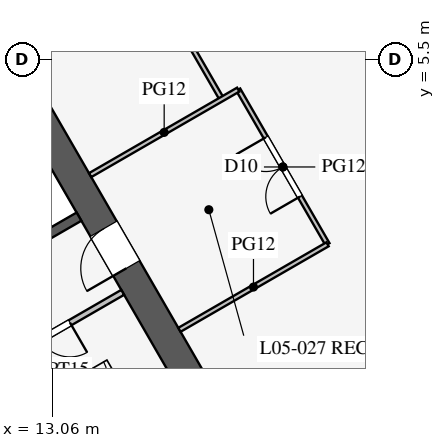
"""IFC4 building model, lengths in metres.
Left out: names, types, materials, properties, quantities, classifications, styles, units other than length and angle.
Written with IfcOpenShell. Run it as: python <this file> out.ifc"""

import sys

from ifc_helpers import new_model, si_unit, direction, frame, frame_2d, origin, place, context, subcontext, project, spatial, rectangle, extrude, element, fill, save


model = new_model("IFC4")
c1 = context("Model", 3, precision=1e-05, world=origin(), true_north=direction((0.0, 1.0)))
c2 = subcontext(c1, "Body", "Model", "MODEL_VIEW")
j1 = project(units=[si_unit("LENGTHUNIT", "METRE"), si_unit("PLANEANGLEUNIT", "RADIAN")], contexts=[c1])
p1 = place(None, origin())
s1 = spatial("IfcSite", under=j1, at=p1, CompositionType="ELEMENT")
p2 = place(p1, origin())
s2 = spatial("IfcBuilding", under=s1, at=p2, CompositionType="ELEMENT")
p3 = place(p2, frame((0.0, 0.0, 24.9)))
s3 = spatial("IfcBuildingStorey", under=s2, at=p3, CompositionType="ELEMENT", Elevation=24.9)
p4 = place(p3, frame((16.743, -3.0, 0.0), z_axis=(0.0, 0.0, 1.0), x_axis=(-0.500002442456, 0.866023993627, 0.0)))
e1 = element("IfcWall", 1, at=p4, inside=s3, PredefinedType="SHEAR", context=c2, shape_type="SweptSolid", body=[
    extrude(rectangle(XDim=21.939, YDim=0.8, at=frame_2d((10.97, 0.0))), origin(), (0.0, 0.0, 1.0), 4.2),
])
p5 = place(p4, frame((17.27, 0.0, 0.0)))
e2 = element("IfcOpeningElement", 2, at=p5, cuts=e1, PredefinedType="OPENING", context=c2, shape_type="SweptSolid", body=[
    extrude(rectangle(XDim=1.2, YDim=2.1, at=frame_2d((0.6, 1.05))), frame((0.0, 0.41, 0.0), z_axis=(0.0, -1.0, 0.0), x_axis=(1.0, 0.0, 0.0)), (0.0, 0.0, 1.0), 0.82),
])
p6 = place(p4, frame((3.47, 0.0, 0.0)))
e3 = element("IfcOpeningElement", 3, at=p6, cuts=e1, PredefinedType="OPENING", context=c2, shape_type="SweptSolid", body=[
    extrude(rectangle(XDim=1.2, YDim=2.1, at=frame_2d((0.6, 1.05))), frame((0.0, 0.41, 0.0), z_axis=(0.0, -1.0, 0.0), x_axis=(1.0, 0.0, 0.0)), (0.0, 0.0, 1.0), 0.82),
])
p7 = place(p3, frame((11.532, 0.076, 0.0), z_axis=(0.0, 0.0, 1.0), x_axis=(0.866005588531, 0.500034319456, 0.0)))
e4 = element("IfcWall", 4, at=p7, inside=s3, PredefinedType="SHEAR", context=c2, shape_type="SweptSolid", body=[
    extrude(rectangle(XDim=2.575, YDim=0.25, at=frame_2d((1.288, 0.0))), origin(), (0.0, 0.0, 1.0), 4.2),
])
p8 = place(p3, frame((6.663, -1.509, 0.0), z_axis=(0.0, 0.0, 1.0), x_axis=(0.866019375473, -0.500010441196, 0.0)))
e5 = element("IfcWall", 5, at=p8, inside=s3, PredefinedType="SHEAR", context=c2, shape_type="SweptSolid", body=[
    extrude(rectangle(XDim=9.075, YDim=0.6, at=frame_2d((4.538, 0.0))), origin(), (0.0, 0.0, 1.0), 4.2),
])
p9 = place(p3, frame((10.495, -3.178, 0.0), z_axis=(0.0, 0.0, 1.0), x_axis=(0.86602216432, 0.500005610874, 0.0)))
e6 = element("IfcWall", 6, at=p9, inside=s3, PredefinedType="PARTITIONING", context=c2, shape_type="SweptSolid", body=[
    extrude(rectangle(XDim=5.1, YDim=0.15, at=frame_2d((2.55, 0.0))), origin(), (0.0, 0.0, 1.0), 4.0),
])
p10 = place(p9, frame((2.6, 0.0, 0.0)))
e7 = element("IfcOpeningElement", 7, at=p10, cuts=e6, PredefinedType="OPENING", context=c2, shape_type="SweptSolid", body=[
    extrude(rectangle(XDim=0.9, YDim=2.1, at=frame_2d((0.45, 1.05))), frame((0.0, 0.085, 0.0), z_axis=(0.0, -1.0, 0.0), x_axis=(1.0, 0.0, 0.0)), (0.0, 0.0, 1.0), 0.17),
])
p11 = place(p3, frame((17.519, 4.457, 0.0), z_axis=(0.0, 0.0, 1.0), x_axis=(-0.500016814911, 0.866015695474, 0.0)))
e8 = element("IfcWall", 8, at=p11, inside=s3, PredefinedType="PARTITIONING", context=c2, shape_type="SweptSolid", body=[
    extrude(rectangle(XDim=5.6, YDim=0.12, at=frame_2d((2.8, 0.0))), origin(), (0.0, 0.0, 1.0), 2.9),
])
p12 = place(p11, frame((2.3, 0.0, 0.15)))
e9 = element("IfcOpeningElement", 9, at=p12, cuts=e8, PredefinedType="OPENING", context=c2, shape_type="SweptSolid", body=[
    extrude(rectangle(XDim=1.0, YDim=2.1, at=frame_2d((0.5, 1.05))), frame((0.0, 0.07, 0.0), z_axis=(0.0, -1.0, 0.0), x_axis=(1.0, 0.0, 0.0)), (0.0, 0.0, 1.0), 0.14),
])
p13 = place(p3, frame((20.302, 0.636, 0.0), z_axis=(0.0, 0.0, 1.0), x_axis=(-0.499977259774, 0.866038532462, 0.0)))
e10 = element("IfcWall", 10, at=p13, inside=s3, PredefinedType="PARTITIONING", context=c2, shape_type="SweptSolid", body=[
    extrude(rectangle(XDim=4.7, YDim=0.12, at=frame_2d((2.35, 0.0))), origin(), (0.0, 0.0, 1.0), 2.9),
])
p14 = place(p13, frame((1.45, 0.0, 0.15)))
e11 = element("IfcOpeningElement", 11, at=p14, cuts=e10, PredefinedType="OPENING", context=c2, shape_type="SweptSolid", body=[
    extrude(rectangle(XDim=1.8, YDim=2.1, at=frame_2d((0.9, 1.05))), frame((0.0, 0.07, 0.0), z_axis=(0.0, -1.0, 0.0), x_axis=(1.0, 0.0, 0.0)), (0.0, 0.0, 1.0), 0.14),
])
p15 = place(p3, frame((14.055, 2.457, 0.0), z_axis=(0.0, 0.0, 1.0), x_axis=(0.866031096941, 0.499990139034, 0.0)))
e12 = element("IfcWall", 12, at=p15, inside=s3, PredefinedType="PARTITIONING", context=c2, shape_type="SweptSolid", body=[
    extrude(rectangle(XDim=4.5, YDim=0.12, at=frame_2d((2.25, 0.0))), origin(), (0.0, 0.0, 1.0), 2.9),
])
p16 = place(p3, frame((16.405, -1.614, 0.0), z_axis=(0.0, 0.0, 1.0), x_axis=(0.866017533419, 0.500013631625, 0.0)))
e13 = element("IfcWall", 13, at=p16, inside=s3, PredefinedType="PARTITIONING", context=c2, shape_type="SweptSolid", body=[
    extrude(rectangle(XDim=4.5, YDim=0.12, at=frame_2d((2.25, 0.0))), origin(), (0.0, 0.0, 1.0), 2.9),
])
p17 = place(p10, frame((0.9, 0.0, 0.0), z_axis=(0.0, 0.0, 1.0), x_axis=(-1.0, 0.0, 0.0)))
e14 = element("IfcDoor", 14, at=p17, inside=s3, OperationType="SINGLE_SWING_LEFT", PredefinedType="DOOR", context=c2, shape_type="SweptSolid", body=[
    extrude(rectangle(XDim=0.9, YDim=2.1, at=frame_2d((0.45, 1.05))), frame((0.0, 0.025, 0.0), z_axis=(0.0, -1.0, 0.0), x_axis=(1.0, 0.0, 0.0)), (0.0, 0.0, 1.0), 0.05),
])
fill(e7, e14)
p18 = place(p6, origin())
e15 = element("IfcDoor", 15, at=p18, inside=s3, OperationType="SINGLE_SWING_LEFT", PredefinedType="DOOR", context=c2, shape_type="SweptSolid", body=[
    extrude(rectangle(XDim=1.2, YDim=2.1, at=frame_2d((0.6, 1.05))), frame((0.0, 0.025, 0.0), z_axis=(0.0, -1.0, 0.0), x_axis=(1.0, 0.0, 0.0)), (0.0, 0.0, 1.0), 0.05),
])
fill(e3, e15)
p19 = place(p14, origin())
e16 = element("IfcDoor", 16, at=p19, inside=s3, OperationType="DOUBLE_DOOR_SINGLE_SWING", PredefinedType="DOOR", context=c2, shape_type="SweptSolid", body=[
    extrude(rectangle(XDim=1.8, YDim=2.1, at=frame_2d((0.9, 1.05))), frame((0.0, 0.025, 0.0), z_axis=(0.0, -1.0, 0.0), x_axis=(1.0, 0.0, 0.0)), (0.0, 0.0, 1.0), 0.05),
])
fill(e11, e16)
save(model, sys.argv[1])
